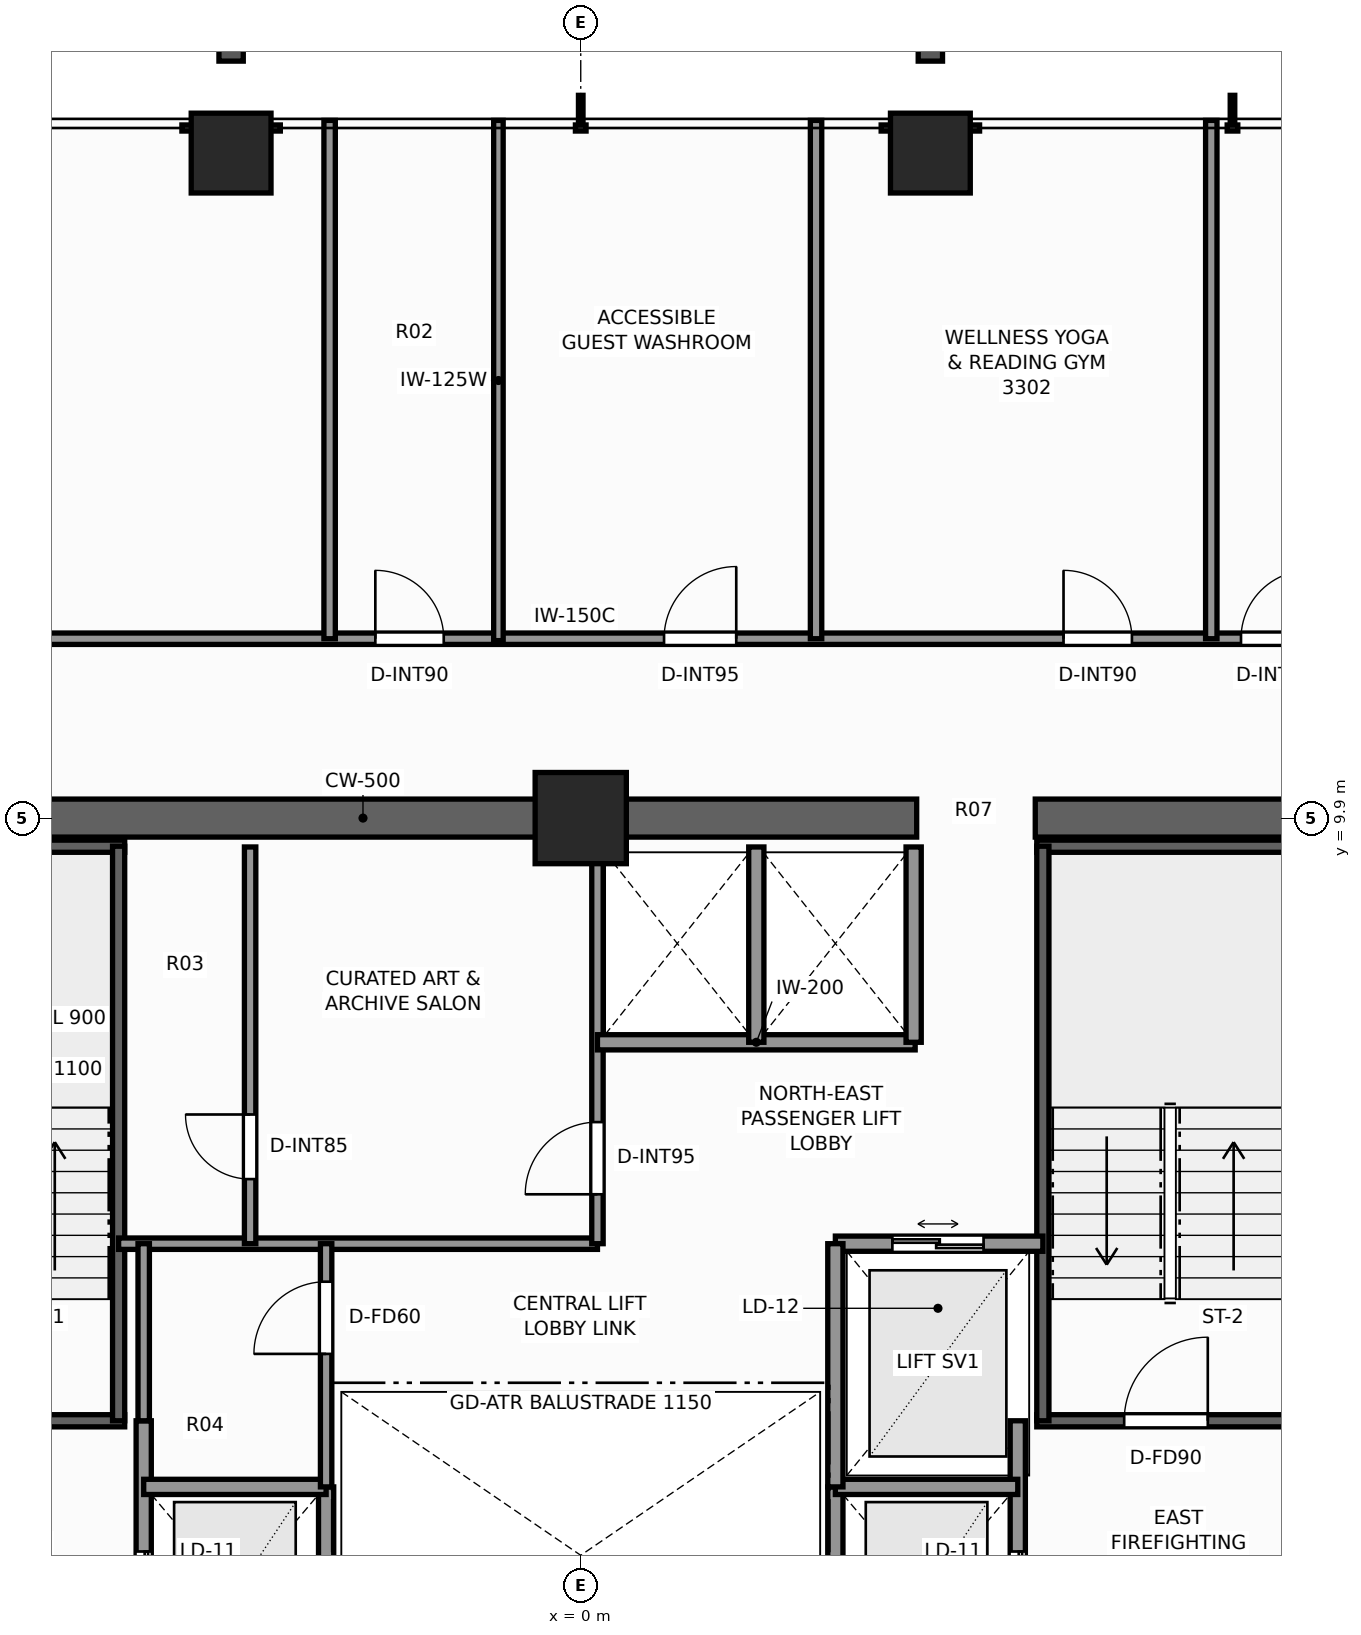
"""IFC4 building model, lengths in metres.
Left out: names, types, materials, properties, quantities, classifications, styles, units other than length and angle.
Written with IfcOpenShell. Run it as: python <this file> out.ifc"""

import sys

from ifc_helpers import new_model, si_unit, direction, frame, frame_2d, origin, origin_2d, place, context, subcontext, project, spatial, rectangle, extrude, element, fill, save


model = new_model("IFC4")
c1 = context("Model", 3, precision=1e-05, world=origin(), true_north=direction((0.0, 1.0)))
c2 = subcontext(c1, "Body", "Model", "MODEL_VIEW")
j1 = project(units=[si_unit("LENGTHUNIT", "METRE"), si_unit("PLANEANGLEUNIT", "RADIAN")], contexts=[c1])
p1 = place(None, origin())
s1 = spatial("IfcSite", under=j1, at=p1, CompositionType="ELEMENT")
p2 = place(p1, origin())
s2 = spatial("IfcBuilding", under=s1, at=p2, CompositionType="ELEMENT")
p3 = place(p2, frame((0.0, 0.0, 115.1)))
s3 = spatial("IfcBuildingStorey", under=s2, at=p3, CompositionType="ELEMENT", Elevation=115.1)
p4 = place(p3, frame((-10.15, 9.9, 0.0), z_axis=(0.0, 0.0, 1.0), x_axis=(1.0, 0.0, 0.0)))
e1 = element("IfcWall", 1, at=p4, inside=s3, PredefinedType="SHEAR", context=c2, shape_type="SweptSolid", body=[
    extrude(rectangle(XDim=14.57, YDim=0.5, at=frame_2d((7.285, 0.0))), origin(), (0.0, 0.0, 1.0), 3.3),
])
p5 = place(p3, frame((5.98, 9.9, 0.0), z_axis=(0.0, 0.0, 1.0), x_axis=(1.0, 0.0, 0.0)))
e2 = element("IfcWall", 2, at=p5, inside=s3, PredefinedType="SHEAR", context=c2, shape_type="SweptSolid", body=[
    extrude(rectangle(XDim=4.17, YDim=0.5, at=frame_2d((2.085, 0.0))), origin(), (0.0, 0.0, 1.0), 3.3),
])
p6 = place(p3, frame((0.0, 9.9, 0.0), z_axis=(0.0, 0.0, 1.0), x_axis=(1.0, 0.0, 0.0)))
e3 = element("IfcColumn", 3, at=p6, inside=s3, PredefinedType="COLUMN", context=c2, shape_type="SweptSolid", body=[
    extrude(rectangle(XDim=1.2, YDim=1.2, at=origin_2d()), origin(), (0.0, 0.0, 1.0), 3.3),
])
for number, where, z_axis, x_axis in (
    (4, (-4.6, 18.65, 0.0), (0.0, 0.0, 1.0), (1.0, 0.0, 0.0)),
    (5, (4.6, 18.65, 0.0), (0.0, 0.0, 1.0), (1.0, 0.0, 0.0)),
):
    element("IfcColumn", number, at=place(p3, frame(where, z_axis=z_axis, x_axis=x_axis)), inside=s3, PredefinedType="COLUMN", context=c2, shape_type="SweptSolid", body=[
        extrude(rectangle(XDim=1.05, YDim=1.05, at=origin_2d()), origin(), (0.0, 0.0, 1.0), 3.3),
    ])
p7 = place(p3, frame((-9.52, 1.97, 0.0), z_axis=(0.0, 0.0, 1.0), x_axis=(1.0, 0.0, 0.0)))
e6 = element("IfcWall", 6, at=p7, inside=s3, PredefinedType="SHEAR", context=c2, shape_type="SweptSolid", body=[
    extrude(rectangle(XDim=3.52, YDim=0.16, at=frame_2d((1.76, 0.0))), origin(), (0.0, 0.0, 1.0), 3.3),
])
p8 = place(p7, frame((1.15, 0.0, 0.0)))
e7 = element("IfcOpeningElement", 7, at=p8, cuts=e6, PredefinedType="OPENING", context=c2, shape_type="SweptSolid", body=[
    extrude(rectangle(XDim=1.1, YDim=2.2, at=frame_2d((0.55, 1.1))), frame((0.0, 0.09, 0.0), z_axis=(0.0, -1.0, 0.0), x_axis=(1.0, 0.0, 0.0)), (0.0, 0.0, 1.0), 0.18),
])
p9 = place(p3, frame((-9.52, 9.53, 0.0), z_axis=(0.0, 0.0, 1.0), x_axis=(1.0, 0.0, 0.0)))
e8 = element("IfcWall", 8, at=p9, inside=s3, PredefinedType="SHEAR", context=c2, shape_type="SweptSolid", body=[
    extrude(rectangle(XDim=3.52, YDim=0.16, at=frame_2d((1.76, 0.0))), origin(), (0.0, 0.0, 1.0), 3.3),
])
p10 = place(p3, frame((-6.08, 1.97, 0.0), z_axis=(0.0, 0.0, 1.0), x_axis=(0.0, 1.0, 0.0)))
e9 = element("IfcWall", 9, at=p10, inside=s3, PredefinedType="SHEAR", context=c2, shape_type="SweptSolid", body=[
    extrude(rectangle(XDim=7.56, YDim=0.16, at=frame_2d((3.78, 0.0))), origin(), (0.0, 0.0, 1.0), 3.3),
])
p11 = place(p3, frame((6.0, 1.97, 0.0), z_axis=(0.0, 0.0, 1.0), x_axis=(1.0, 0.0, 0.0)))
e10 = element("IfcWall", 10, at=p11, inside=s3, PredefinedType="SHEAR", context=c2, shape_type="SweptSolid", body=[
    extrude(rectangle(XDim=3.52, YDim=0.16, at=frame_2d((1.76, 0.0))), origin(), (0.0, 0.0, 1.0), 3.3),
])
p12 = place(p11, frame((1.15, 0.0, 0.0)))
e11 = element("IfcOpeningElement", 11, at=p12, cuts=e10, PredefinedType="OPENING", context=c2, shape_type="SweptSolid", body=[
    extrude(rectangle(XDim=1.1, YDim=2.2, at=frame_2d((0.55, 1.1))), frame((0.0, 0.09, 0.0), z_axis=(0.0, -1.0, 0.0), x_axis=(1.0, 0.0, 0.0)), (0.0, 0.0, 1.0), 0.18),
])
p13 = place(p3, frame((6.0, 9.53, 0.0), z_axis=(0.0, 0.0, 1.0), x_axis=(1.0, 0.0, 0.0)))
e12 = element("IfcWall", 12, at=p13, inside=s3, PredefinedType="SHEAR", context=c2, shape_type="SweptSolid", body=[
    extrude(rectangle(XDim=3.52, YDim=0.16, at=frame_2d((1.76, 0.0))), origin(), (0.0, 0.0, 1.0), 3.3),
])
p14 = place(p3, frame((6.08, 1.97, 0.0), z_axis=(0.0, 0.0, 1.0), x_axis=(0.0, 1.0, 0.0)))
e13 = element("IfcWall", 13, at=p14, inside=s3, PredefinedType="SHEAR", context=c2, shape_type="SweptSolid", body=[
    extrude(rectangle(XDim=7.56, YDim=0.16, at=frame_2d((3.78, 0.0))), origin(), (0.0, 0.0, 1.0), 3.3),
])
p15 = place(p3, frame((-5.75, -3.6, 0.0), z_axis=(0.0, 0.0, 1.0), x_axis=(0.0, 1.0, 0.0)))
e14 = element("IfcWall", 14, at=p15, inside=s3, PredefinedType="SOLIDWALL", context=c2, shape_type="SweptSolid", body=[
    extrude(rectangle(XDim=5.57, YDim=0.2, at=frame_2d((2.785, 0.0))), origin(), (0.0, 0.0, 1.0), 2.715),
])
p16 = place(p15, frame((2.75, 0.0, 0.0)))
e15 = element("IfcOpeningElement", 15, at=p16, cuts=e14, PredefinedType="OPENING", context=c2, shape_type="SweptSolid", body=[
    extrude(rectangle(XDim=1.1, YDim=2.2, at=frame_2d((0.55, 1.1))), frame((0.0, 0.11, 0.0), z_axis=(0.0, -1.0, 0.0), x_axis=(1.0, 0.0, 0.0)), (0.0, 0.0, 1.0), 0.22),
])
p17 = place(p3, frame((-3.35, -1.7, 0.0), z_axis=(0.0, 0.0, 1.0), x_axis=(0.0, 1.0, 0.0)))
e16 = element("IfcWall", 16, at=p17, inside=s3, PredefinedType="SOLIDWALL", context=c2, shape_type="SweptSolid", body=[
    extrude(rectangle(XDim=2.8, YDim=0.2, at=frame_2d((1.4, 0.0))), origin(), (0.0, 0.0, 1.0), 2.715),
])
p18 = place(p3, frame((-5.75, 1.1, 0.0), z_axis=(0.0, 0.0, 1.0), x_axis=(1.0, 0.0, 0.0)))
e17 = element("IfcWall", 17, at=p18, inside=s3, PredefinedType="SOLIDWALL", context=c2, shape_type="SweptSolid", body=[
    extrude(rectangle(XDim=2.4, YDim=0.2, at=frame_2d((1.2, 0.0))), origin(), (0.0, 0.0, 1.0), 3.08),
])
p19 = place(p3, frame((5.75, -3.6, 0.0), z_axis=(0.0, 0.0, 1.0), x_axis=(0.0, 1.0, 0.0)))
e18 = element("IfcWall", 18, at=p19, inside=s3, PredefinedType="SOLIDWALL", context=c2, shape_type="SweptSolid", body=[
    extrude(rectangle(XDim=5.57, YDim=0.2, at=frame_2d((2.785, 0.0))), origin(), (0.0, 0.0, 1.0), 2.715),
])
p20 = place(p19, frame((2.75, 0.0, 0.0)))
e19 = element("IfcOpeningElement", 19, at=p20, cuts=e18, PredefinedType="OPENING", context=c2, shape_type="SweptSolid", body=[
    extrude(rectangle(XDim=1.1, YDim=2.2, at=frame_2d((0.55, 1.1))), frame((0.0, 0.11, 0.0), z_axis=(0.0, -1.0, 0.0), x_axis=(1.0, 0.0, 0.0)), (0.0, 0.0, 1.0), 0.22),
])
p21 = place(p3, frame((3.35, -1.7, 0.0), z_axis=(0.0, 0.0, 1.0), x_axis=(0.0, 1.0, 0.0)))
e20 = element("IfcWall", 20, at=p21, inside=s3, PredefinedType="SOLIDWALL", context=c2, shape_type="SweptSolid", body=[
    extrude(rectangle(XDim=2.8, YDim=0.2, at=frame_2d((1.4, 0.0))), origin(), (0.0, 0.0, 1.0), 2.715),
])
p22 = place(p3, frame((3.35, 1.1, 0.0), z_axis=(0.0, 0.0, 1.0), x_axis=(1.0, 0.0, 0.0)))
e21 = element("IfcWall", 21, at=p22, inside=s3, PredefinedType="SOLIDWALL", context=c2, shape_type="SweptSolid", body=[
    extrude(rectangle(XDim=2.4, YDim=0.2, at=frame_2d((1.2, 0.0))), origin(), (0.0, 0.0, 1.0), 3.08),
])
p23 = place(p3, frame((3.35, 4.3, 0.0), z_axis=(0.0, 0.0, 1.0), x_axis=(1.0, 0.0, 0.0)))
e22 = element("IfcWall", 22, at=p23, inside=s3, PredefinedType="SOLIDWALL", context=c2, shape_type="SweptSolid", body=[
    extrude(rectangle(XDim=2.73, YDim=0.2, at=frame_2d((1.365, 0.0))), origin(), (0.0, 0.0, 1.0), 3.08),
])
p24 = place(p23, frame((0.75, 0.0, 0.0)))
e23 = element("IfcOpeningElement", 23, at=p24, cuts=e22, PredefinedType="OPENING", context=c2, shape_type="SweptSolid", body=[
    extrude(rectangle(XDim=1.2, YDim=2.25, at=frame_2d((0.6, 1.125))), frame((0.0, 0.11, 0.0), z_axis=(0.0, -1.0, 0.0), x_axis=(1.0, 0.0, 0.0)), (0.0, 0.0, 1.0), 0.22),
])
p25 = place(p3, frame((3.35, 1.1, 0.0), z_axis=(0.0, 0.0, 1.0), x_axis=(0.0, 1.0, 0.0)))
e24 = element("IfcWall", 24, at=p25, inside=s3, PredefinedType="SOLIDWALL", context=c2, shape_type="SweptSolid", body=[
    extrude(rectangle(XDim=3.2, YDim=0.2, at=frame_2d((1.6, 0.0))), origin(), (0.0, 0.0, 1.0), 2.715),
])
p26 = place(p3, frame((-6.08, 4.3, 0.0), z_axis=(0.0, 0.0, 1.0), x_axis=(1.0, 0.0, 0.0)))
e25 = element("IfcWall", 25, at=p26, inside=s3, PredefinedType="PARTITIONING", context=c2, shape_type="SweptSolid", body=[
    extrude(rectangle(XDim=6.3, YDim=0.15, at=frame_2d((3.15, 0.0))), origin(), (0.0, 0.0, 1.0), 3.08),
])
p27 = place(p3, frame((0.22, 4.3, 0.0), z_axis=(0.0, 0.0, 1.0), x_axis=(0.0, 1.0, 0.0)))
e26 = element("IfcWall", 26, at=p27, inside=s3, PredefinedType="PARTITIONING", context=c2, shape_type="SweptSolid", body=[
    extrude(rectangle(XDim=5.22, YDim=0.15, at=frame_2d((2.61, 0.0))), origin(), (0.0, 0.0, 1.0), 3.08),
])
p28 = place(p27, frame((0.65, 0.0, 0.0)))
e27 = element("IfcOpeningElement", 27, at=p28, cuts=e26, PredefinedType="OPENING", context=c2, shape_type="SweptSolid", body=[
    extrude(rectangle(XDim=0.95, YDim=2.06, at=frame_2d((0.475, 1.03))), frame((0.0, 0.085, 0.0), z_axis=(0.0, -1.0, 0.0), x_axis=(1.0, 0.0, 0.0)), (0.0, 0.0, 1.0), 0.17),
])
p29 = place(p3, frame((-4.35, 4.3, 0.0), z_axis=(0.0, 0.0, 1.0), x_axis=(0.0, 1.0, 0.0)))
e28 = element("IfcWall", 28, at=p29, inside=s3, PredefinedType="PARTITIONING", context=c2, shape_type="SweptSolid", body=[
    extrude(rectangle(XDim=5.22, YDim=0.15, at=frame_2d((2.61, 0.0))), origin(), (0.0, 0.0, 1.0), 3.08),
])
p30 = place(p29, frame((0.85, 0.0, 0.0)))
e29 = element("IfcOpeningElement", 29, at=p30, cuts=e28, PredefinedType="OPENING", context=c2, shape_type="SweptSolid", body=[
    extrude(rectangle(XDim=0.85, YDim=2.03, at=frame_2d((0.425, 1.015))), frame((0.0, 0.085, 0.0), z_axis=(0.0, -1.0, 0.0), x_axis=(1.0, 0.0, 0.0)), (0.0, 0.0, 1.0), 0.17),
])
p31 = place(p3, frame((0.22, 6.95, 0.0), z_axis=(0.0, 0.0, 1.0), x_axis=(1.0, 0.0, 0.0)))
e30 = element("IfcWall", 30, at=p31, inside=s3, PredefinedType="SOLIDWALL", context=c2, shape_type="SweptSolid", body=[
    extrude(rectangle(XDim=4.18, YDim=0.2, at=frame_2d((2.09, 0.0))), origin(), (0.0, 0.0, 1.0), 3.08),
])
for number, where, z_axis, x_axis in (
    (31, (4.38, 6.95, 0.0), (0.0, 0.0, 1.0), (0.0, 1.0, 0.0)),
    (32, (2.31, 6.95, 0.0), (0.0, 0.0, 1.0), (0.0, 1.0, 0.0)),
):
    element("IfcWall", number, at=place(p3, frame(where, z_axis=z_axis, x_axis=x_axis)), inside=s3, PredefinedType="SOLIDWALL", context=c2, shape_type="SweptSolid", body=[
        extrude(rectangle(XDim=2.57, YDim=0.2, at=frame_2d((1.285, 0.0))), origin(), (0.0, 0.0, 1.0), 3.08),
    ])
p32 = place(p3, frame((-3.35, 1.1, 0.0), z_axis=(0.0, 0.0, 1.0), x_axis=(0.0, 1.0, 0.0)))
e33 = element("IfcWall", 33, at=p32, inside=s3, PredefinedType="PARTITIONING", context=c2, shape_type="SweptSolid", body=[
    extrude(rectangle(XDim=3.2, YDim=0.15, at=frame_2d((1.6, 0.0))), origin(), (0.0, 0.0, 1.0), 2.715),
])
p33 = place(p32, frame((1.75, 0.0, 0.0)))
e34 = element("IfcOpeningElement", 34, at=p33, cuts=e33, PredefinedType="OPENING", context=c2, shape_type="SweptSolid", body=[
    extrude(rectangle(XDim=0.95, YDim=2.06, at=frame_2d((0.475, 1.03))), frame((0.0, 0.085, 0.0), z_axis=(0.0, -1.0, 0.0), x_axis=(1.0, 0.0, 0.0)), (0.0, 0.0, 1.0), 0.17),
])
p34 = place(p3, frame((-5.75, 1.97, 0.0), z_axis=(0.0, 0.0, 1.0), x_axis=(0.0, 1.0, 0.0)))
e35 = element("IfcWall", 35, at=p34, inside=s3, PredefinedType="PARTITIONING", context=c2, shape_type="SweptSolid", body=[
    extrude(rectangle(XDim=2.33, YDim=0.15, at=frame_2d((1.165, 0.0))), origin(), (0.0, 0.0, 1.0), 2.715),
])
p35 = place(p3, frame((-12.42, 12.26, 0.0), z_axis=(0.0, 0.0, 1.0), x_axis=(1.0, 0.0, 0.0)))
e36 = element("IfcWall", 36, at=p35, inside=s3, PredefinedType="PARTITIONING", context=c2, shape_type="SweptSolid", body=[
    extrude(rectangle(XDim=24.68, YDim=0.15, at=frame_2d((12.34, 0.0))), origin(), (0.0, 0.0, 1.0), 2.292),
])
p36 = place(p35, frame((4.435, 0.0, 0.0)))
e37 = element("IfcOpeningElement", 37, at=p36, cuts=e36, PredefinedType="OPENING", context=c2, shape_type="SweptSolid", body=[
    extrude(rectangle(XDim=0.9, YDim=2.06, at=frame_2d((0.45, 1.03))), frame((0.0, 0.085, 0.0), z_axis=(0.0, -1.0, 0.0), x_axis=(1.0, 0.0, 0.0)), (0.0, 0.0, 1.0), 0.17),
])
p37 = place(p35, frame((9.718, 0.0, 0.0)))
e38 = element("IfcOpeningElement", 38, at=p37, cuts=e36, PredefinedType="OPENING", context=c2, shape_type="SweptSolid", body=[
    extrude(rectangle(XDim=0.9, YDim=2.06, at=frame_2d((0.45, 1.03))), frame((0.0, 0.085, 0.0), z_axis=(0.0, -1.0, 0.0), x_axis=(1.0, 0.0, 0.0)), (0.0, 0.0, 1.0), 0.17),
])
p38 = place(p35, frame((13.516, 0.0, 0.0)))
e39 = element("IfcOpeningElement", 39, at=p38, cuts=e36, PredefinedType="OPENING", context=c2, shape_type="SweptSolid", body=[
    extrude(rectangle(XDim=0.95, YDim=2.06, at=frame_2d((0.475, 1.03))), frame((0.0, 0.085, 0.0), z_axis=(0.0, -1.0, 0.0), x_axis=(1.0, 0.0, 0.0)), (0.0, 0.0, 1.0), 0.17),
])
p39 = place(p35, frame((18.772, 0.0, 0.0)))
e40 = element("IfcOpeningElement", 40, at=p39, cuts=e36, PredefinedType="OPENING", context=c2, shape_type="SweptSolid", body=[
    extrude(rectangle(XDim=0.9, YDim=2.06, at=frame_2d((0.45, 1.03))), frame((0.0, 0.085, 0.0), z_axis=(0.0, -1.0, 0.0), x_axis=(1.0, 0.0, 0.0)), (0.0, 0.0, 1.0), 0.17),
])
p40 = place(p35, frame((21.107, 0.0, 0.0)))
e41 = element("IfcOpeningElement", 41, at=p40, cuts=e36, PredefinedType="OPENING", context=c2, shape_type="SweptSolid", body=[
    extrude(rectangle(XDim=0.9, YDim=2.06, at=frame_2d((0.45, 1.03))), frame((0.0, 0.085, 0.0), z_axis=(0.0, -1.0, 0.0), x_axis=(1.0, 0.0, 0.0)), (0.0, 0.0, 1.0), 0.17),
])
for number, where, z_axis, x_axis in (
    (42, (-3.304, 12.26, 0.0), (0.0, 0.0, 1.0), (0.0, 1.0, 0.0)),
    (43, (3.096, 12.26, 0.0), (0.0, 0.0, 1.0), (0.0, 1.0, 0.0)),
):
    element("IfcWall", number, at=place(p3, frame(where, z_axis=z_axis, x_axis=x_axis)), inside=s3, PredefinedType="PARTITIONING", context=c2, shape_type="SweptSolid", body=[
        extrude(rectangle(XDim=6.82, YDim=0.15, at=frame_2d((3.41, 0.0))), origin(), (0.0, 0.0, 1.0), 2.369),
    ])
p41 = place(p3, frame((-1.083, 12.235, 0.0), z_axis=(0.0, 0.0, 1.0), x_axis=(0.0, 1.0, 0.0)))
e44 = element("IfcWall", 44, at=p41, inside=s3, PredefinedType="PARTITIONING", context=c2, shape_type="SweptSolid", body=[
    extrude(rectangle(XDim=6.845, YDim=0.125, at=frame_2d((3.422, 0.0))), origin(), (0.0, 0.0, 1.0), 2.449),
])
p42 = place(p3, frame((8.296, 12.26, 0.0), z_axis=(0.0, 0.0, 1.0), x_axis=(0.0, 1.0, 0.0)))
e45 = element("IfcWall", 45, at=p42, inside=s3, PredefinedType="PARTITIONING", context=c2, shape_type="SweptSolid", body=[
    extrude(rectangle(XDim=6.82, YDim=0.15, at=frame_2d((3.41, 0.0))), origin(), (0.0, 0.0, 1.0), 2.449),
])
p43 = place(p12, origin())
e46 = element("IfcDoor", 46, at=p43, inside=s3, OperationType="SINGLE_SWING_RIGHT", PredefinedType="DOOR", context=c2, shape_type="SweptSolid", body=[
    extrude(rectangle(XDim=1.1, YDim=2.2, at=frame_2d((0.55, 1.1))), frame((0.0, 0.025, 0.0), z_axis=(0.0, -1.0, 0.0), x_axis=(1.0, 0.0, 0.0)), (0.0, 0.0, 1.0), 0.05),
])
fill(e11, e46)
p44 = place(p16, origin())
e47 = element("IfcDoor", 47, at=p44, inside=s3, OperationType="DOUBLE_DOOR_SLIDING", PredefinedType="DOOR", context=c2, shape_type="SweptSolid", body=[
    extrude(rectangle(XDim=1.1, YDim=2.2, at=frame_2d((0.55, 1.1))), frame((0.0, 0.025, 0.0), z_axis=(0.0, -1.0, 0.0), x_axis=(1.0, 0.0, 0.0)), (0.0, 0.0, 1.0), 0.05),
])
fill(e15, e47)
p45 = place(p20, origin())
e48 = element("IfcDoor", 48, at=p45, inside=s3, OperationType="DOUBLE_DOOR_SLIDING", PredefinedType="DOOR", context=c2, shape_type="SweptSolid", body=[
    extrude(rectangle(XDim=1.1, YDim=2.2, at=frame_2d((0.55, 1.1))), frame((0.0, 0.025, 0.0), z_axis=(0.0, -1.0, 0.0), x_axis=(1.0, 0.0, 0.0)), (0.0, 0.0, 1.0), 0.05),
])
fill(e19, e48)
p46 = place(p24, origin())
e49 = element("IfcDoor", 49, at=p46, inside=s3, OperationType="DOUBLE_DOOR_SLIDING", PredefinedType="DOOR", context=c2, shape_type="SweptSolid", body=[
    extrude(rectangle(XDim=1.2, YDim=2.25, at=frame_2d((0.6, 1.125))), frame((0.0, 0.025, 0.0), z_axis=(0.0, -1.0, 0.0), x_axis=(1.0, 0.0, 0.0)), (0.0, 0.0, 1.0), 0.05),
])
fill(e23, e49)
p47 = place(p28, origin())
e50 = element("IfcDoor", 50, at=p47, inside=s3, OperationType="SINGLE_SWING_LEFT", PredefinedType="DOOR", context=c2, shape_type="SweptSolid", body=[
    extrude(rectangle(XDim=0.95, YDim=2.06, at=frame_2d((0.475, 1.03))), frame((0.0, 0.025, 0.0), z_axis=(0.0, -1.0, 0.0), x_axis=(1.0, 0.0, 0.0)), (0.0, 0.0, 1.0), 0.05),
])
fill(e27, e50)
p48 = place(p30, origin())
e51 = element("IfcDoor", 51, at=p48, inside=s3, OperationType="SINGLE_SWING_RIGHT", PredefinedType="DOOR", context=c2, shape_type="SweptSolid", body=[
    extrude(rectangle(XDim=0.85, YDim=2.03, at=frame_2d((0.425, 1.015))), frame((0.0, 0.025, 0.0), z_axis=(0.0, -1.0, 0.0), x_axis=(1.0, 0.0, 0.0)), (0.0, 0.0, 1.0), 0.05),
])
fill(e29, e51)
p49 = place(p33, origin())
e52 = element("IfcDoor", 52, at=p49, inside=s3, OperationType="SINGLE_SWING_LEFT", PredefinedType="DOOR", context=c2, shape_type="SweptSolid", body=[
    extrude(rectangle(XDim=0.95, YDim=2.06, at=frame_2d((0.475, 1.03))), frame((0.0, 0.025, 0.0), z_axis=(0.0, -1.0, 0.0), x_axis=(1.0, 0.0, 0.0)), (0.0, 0.0, 1.0), 0.05),
])
fill(e34, e52)
p50 = place(p37, origin())
e53 = element("IfcDoor", 53, at=p50, inside=s3, OperationType="SINGLE_SWING_LEFT", PredefinedType="DOOR", context=c2, shape_type="SweptSolid", body=[
    extrude(rectangle(XDim=0.9, YDim=2.06, at=frame_2d((0.45, 1.03))), frame((0.0, 0.025, 0.0), z_axis=(0.0, -1.0, 0.0), x_axis=(1.0, 0.0, 0.0)), (0.0, 0.0, 1.0), 0.05),
])
fill(e38, e53)
p51 = place(p38, origin())
e54 = element("IfcDoor", 54, at=p51, inside=s3, OperationType="SINGLE_SWING_RIGHT", PredefinedType="DOOR", context=c2, shape_type="SweptSolid", body=[
    extrude(rectangle(XDim=0.95, YDim=2.06, at=frame_2d((0.475, 1.03))), frame((0.0, 0.025, 0.0), z_axis=(0.0, -1.0, 0.0), x_axis=(1.0, 0.0, 0.0)), (0.0, 0.0, 1.0), 0.05),
])
fill(e39, e54)
p52 = place(p39, origin())
e55 = element("IfcDoor", 55, at=p52, inside=s3, OperationType="SINGLE_SWING_LEFT", PredefinedType="DOOR", context=c2, shape_type="SweptSolid", body=[
    extrude(rectangle(XDim=0.9, YDim=2.06, at=frame_2d((0.45, 1.03))), frame((0.0, 0.025, 0.0), z_axis=(0.0, -1.0, 0.0), x_axis=(1.0, 0.0, 0.0)), (0.0, 0.0, 1.0), 0.05),
])
fill(e40, e55)
p53 = place(p40, origin())
e56 = element("IfcDoor", 56, at=p53, inside=s3, OperationType="SINGLE_SWING_RIGHT", PredefinedType="DOOR", context=c2, shape_type="SweptSolid", body=[
    extrude(rectangle(XDim=0.9, YDim=2.06, at=frame_2d((0.45, 1.03))), frame((0.0, 0.025, 0.0), z_axis=(0.0, -1.0, 0.0), x_axis=(1.0, 0.0, 0.0)), (0.0, 0.0, 1.0), 0.05),
])
fill(e41, e56)
save(model, sys.argv[1])
